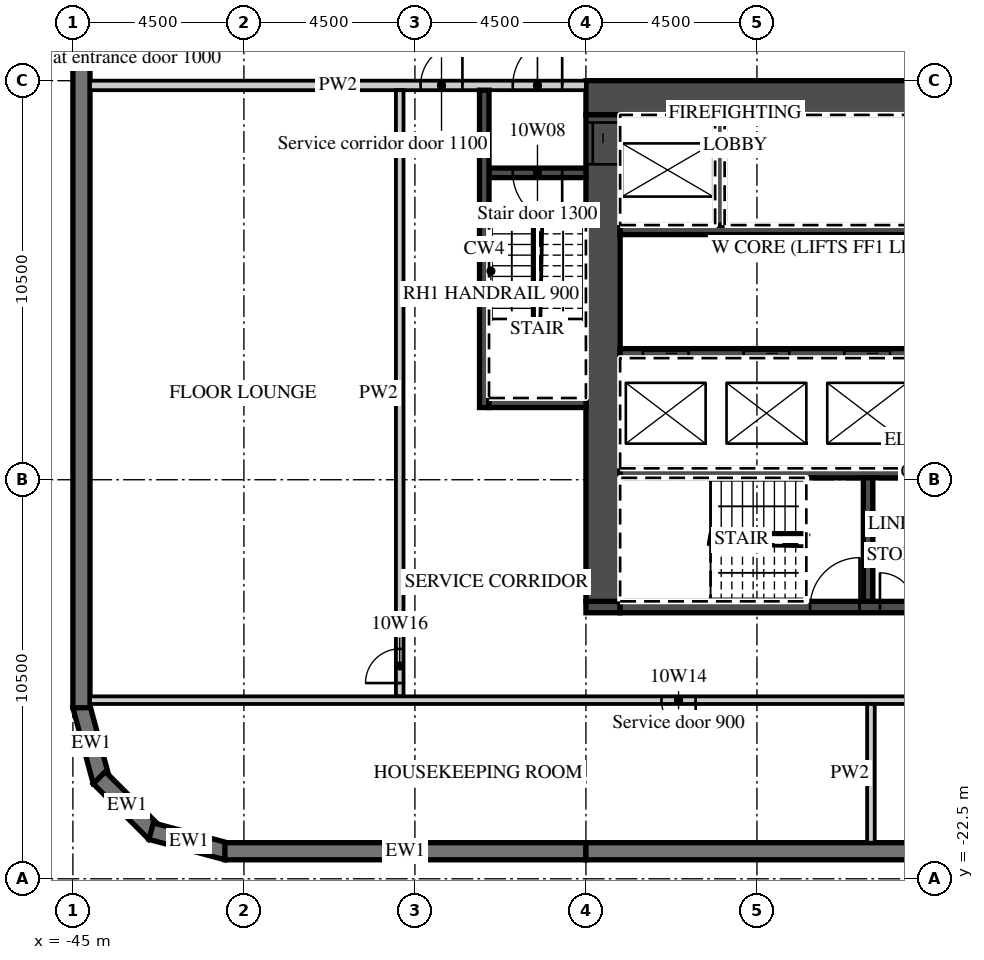
"""IFC4 building model, lengths in metres.
Left out: names, types, materials, properties, quantities, classifications, styles, units other than length and angle.
Written with IfcOpenShell. Run it as: python <this file> out.ifc"""

import sys

from ifc_helpers import new_model, si_unit, direction, frame, frame_2d, origin, place, context, subcontext, project, spatial, polyline, rectangle, outline, extrude, element, fill, save


model = new_model("IFC4")
c1 = context("Model", 3, precision=1e-05, world=origin(), true_north=direction((0.0, 1.0)))
c2 = subcontext(c1, "Body", "Model", "MODEL_VIEW")
j1 = project(units=[si_unit("LENGTHUNIT", "METRE"), si_unit("PLANEANGLEUNIT", "RADIAN")], contexts=[c1])
p1 = place(None, origin())
s1 = spatial("IfcSite", under=j1, at=p1, CompositionType="ELEMENT")
p2 = place(p1, origin())
s2 = spatial("IfcBuilding", under=s1, at=p2, CompositionType="ELEMENT")
p3 = place(p2, frame((0.0, 0.0, 63.3)))
s3 = spatial("IfcBuildingStorey", under=s2, at=p3, CompositionType="ELEMENT", Elevation=63.3)
p4 = place(p3, frame((-44.783, -17.942, 0.0), z_axis=(0.0, 0.0, 1.0), x_axis=(0.25881466832, -0.965926999034, 0.0)))
e1 = element("IfcWall", 1, at=p4, inside=s3, PredefinedType="SOLIDWALL", context=c2, shape_type="SweptSolid", body=[
    extrude(outline(polyline([(0.0, -0.225), (2.071, -0.225), (1.95, 0.225), (0.121, 0.225), (0.0, -0.225)])), origin(), (0.0, 0.0, 1.0), 3.02),
])
p5 = place(p3, frame((-44.305, -19.841, 0.0), z_axis=(0.0, 0.0, 1.0), x_axis=(0.707106781187, -0.707106781187, 0.0)))
e2 = element("IfcWall", 2, at=p5, inside=s3, PredefinedType="SOLIDWALL", context=c2, shape_type="SweptSolid", body=[
    extrude(outline(polyline([(0.0, -0.225), (2.071, -0.225), (1.95, 0.225), (0.121, 0.225), (0.0, -0.225)])), origin(), (0.0, 0.0, 1.0), 3.02),
])
p6 = place(p3, frame((-42.942, -21.247, 0.0), z_axis=(0.0, 0.0, 1.0), x_axis=(0.965926999034, -0.25881466832, 0.0)))
e3 = element("IfcWall", 3, at=p6, inside=s3, PredefinedType="SOLIDWALL", context=c2, shape_type="SweptSolid", body=[
    extrude(outline(polyline([(-0.0, -0.225), (2.07, -0.225), (1.95, 0.225), (0.12, 0.225), (-0.0, -0.225)])), origin(), (0.0, 0.0, 1.0), 3.02),
])
p7 = place(p3, frame((-41.0, -21.775, 0.0), z_axis=(0.0, 0.0, 1.0), x_axis=(1.0, 0.0, 0.0)))
e4 = element("IfcWall", 4, at=p7, inside=s3, PredefinedType="SOLIDWALL", context=c2, shape_type="SweptSolid", body=[
    extrude(rectangle(XDim=9.5, YDim=0.45, at=frame_2d((4.75, 0.0))), origin(), (0.0, 0.0, 1.0), 3.02),
])
p8 = place(p3, frame((-31.5, -21.775, 0.0), z_axis=(0.0, 0.0, 1.0), x_axis=(1.0, 0.0, 0.0)))
e5 = element("IfcWall", 5, at=p8, inside=s3, PredefinedType="SOLIDWALL", context=c2, shape_type="SweptSolid", body=[
    extrude(rectangle(XDim=18.0, YDim=0.45, at=frame_2d((9.0, 0.0))), origin(), (0.0, 0.0, 1.0), 3.02),
])
p9 = place(p3, frame((-44.775, 18.0, 0.0), z_axis=(0.0, 0.0, 1.0), x_axis=(0.0, -1.0, 0.0)))
e6 = element("IfcWall", 6, at=p9, inside=s3, PredefinedType="SOLIDWALL", context=c2, shape_type="SweptSolid", body=[
    extrude(rectangle(XDim=36.0, YDim=0.45, at=frame_2d((18.0, 0.0))), origin(), (0.0, 0.0, 1.0), 3.02),
])
p10 = place(p9, frame((3.9, 0.0, 0.45)))
e7 = element("IfcOpeningElement", 7, at=p10, cuts=e6, PredefinedType="OPENING", context=c2, shape_type="SweptSolid", body=[
    extrude(rectangle(XDim=3.3, YDim=2.25, at=frame_2d((1.65, 1.125))), frame((0.0, 0.235, 0.0), z_axis=(0.0, -1.0, 0.0), x_axis=(1.0, 0.0, 0.0)), (0.0, 0.0, 1.0), 0.47),
])
p11 = place(p9, frame((8.4, 0.0, 0.45)))
e8 = element("IfcOpeningElement", 8, at=p11, cuts=e6, PredefinedType="OPENING", context=c2, shape_type="SweptSolid", body=[
    extrude(rectangle(XDim=3.3, YDim=2.25, at=frame_2d((1.65, 1.125))), frame((0.0, 0.235, 0.0), z_axis=(0.0, -1.0, 0.0), x_axis=(1.0, 0.0, 0.0)), (0.0, 0.0, 1.0), 0.47),
])
p12 = place(p9, frame((12.9, 0.0, 0.45)))
e9 = element("IfcOpeningElement", 9, at=p12, cuts=e6, PredefinedType="OPENING", context=c2, shape_type="SweptSolid", body=[
    extrude(rectangle(XDim=3.3, YDim=2.25, at=frame_2d((1.65, 1.125))), frame((0.0, 0.235, 0.0), z_axis=(0.0, -1.0, 0.0), x_axis=(1.0, 0.0, 0.0)), (0.0, 0.0, 1.0), 0.47),
])
p13 = place(p3, frame((-31.5, -1.95, 0.0), z_axis=(0.0, 0.0, 1.0), x_axis=(1.0, 0.0, 0.0)))
e10 = element("IfcWall", 10, at=p13, inside=s3, PredefinedType="SHEAR", context=c2, shape_type="SweptSolid", body=[
    extrude(rectangle(XDim=18.0, YDim=0.9, at=frame_2d((9.0, 0.0))), origin(), (0.0, 0.0, 1.0), 3.02),
])
p14 = place(p13, frame((14.725, 0.0, 0.0)))
e11 = element("IfcOpeningElement", 11, at=p14, cuts=e10, PredefinedType="OPENING", context=c2, shape_type="SweptSolid", body=[
    extrude(rectangle(XDim=1.8, YDim=2.1, at=frame_2d((0.9, 1.05))), frame((0.0, 0.46, 0.0), z_axis=(0.0, -1.0, 0.0), x_axis=(1.0, 0.0, 0.0)), (0.0, 0.0, 1.0), 0.92),
])
p15 = place(p3, frame((-31.5, -15.35, 0.0), z_axis=(0.0, 0.0, 1.0), x_axis=(1.0, 0.0, 0.0)))
e12 = element("IfcWall", 12, at=p15, inside=s3, PredefinedType="SHEAR", context=c2, shape_type="SweptSolid", body=[
    extrude(rectangle(XDim=0.9, YDim=0.3, at=frame_2d((0.45, 0.0))), origin(), (0.0, 0.0, 1.0), 3.02),
])
p16 = place(p3, frame((-30.6, -15.35, 0.0), z_axis=(0.0, 0.0, 1.0), x_axis=(1.0, 0.0, 0.0)))
e13 = element("IfcWall", 13, at=p16, inside=s3, PredefinedType="SHEAR", context=c2, shape_type="SweptSolid", body=[
    extrude(rectangle(XDim=10.3, YDim=0.3, at=frame_2d((5.15, 0.0))), origin(), (0.0, 0.0, 1.0), 3.02),
])
p17 = place(p16, frame((5.0, 0.0, 0.0)))
e14 = element("IfcOpeningElement", 14, at=p17, cuts=e13, PredefinedType="OPENING", context=c2, shape_type="SweptSolid", body=[
    extrude(rectangle(XDim=1.3, YDim=2.1, at=frame_2d((0.65, 1.05))), frame((0.0, 0.16, 0.0), z_axis=(0.0, -1.0, 0.0), x_axis=(1.0, 0.0, 0.0)), (0.0, 0.0, 1.0), 0.32),
])
p18 = place(p16, frame((6.837, 0.0, 0.0)))
e15 = element("IfcOpeningElement", 15, at=p18, cuts=e13, PredefinedType="OPENING", context=c2, shape_type="SweptSolid", body=[
    extrude(rectangle(XDim=0.9, YDim=2.1, at=frame_2d((0.45, 1.05))), frame((0.0, 0.16, 0.0), z_axis=(0.0, -1.0, 0.0), x_axis=(1.0, 0.0, 0.0)), (0.0, 0.0, 1.0), 0.32),
])
p19 = place(p16, frame((8.663, 0.0, 0.0)))
e16 = element("IfcOpeningElement", 16, at=p19, cuts=e13, PredefinedType="OPENING", context=c2, shape_type="SweptSolid", body=[
    extrude(rectangle(XDim=0.9, YDim=2.1, at=frame_2d((0.45, 1.05))), frame((0.0, 0.16, 0.0), z_axis=(0.0, -1.0, 0.0), x_axis=(1.0, 0.0, 0.0)), (0.0, 0.0, 1.0), 0.32),
])
p20 = place(p3, frame((-31.05, -15.2, 0.0), z_axis=(0.0, 0.0, 1.0), x_axis=(0.0, 1.0, 0.0)))
e17 = element("IfcWall", 17, at=p20, inside=s3, PredefinedType="SHEAR", context=c2, shape_type="SweptSolid", body=[
    extrude(rectangle(XDim=12.8, YDim=0.9, at=frame_2d((6.4, 0.0))), origin(), (0.0, 0.0, 1.0), 3.02),
])
p21 = place(p20, frame((11.5, 0.0, 0.0)))
e18 = element("IfcOpeningElement", 18, at=p21, cuts=e17, PredefinedType="OPENING", context=c2, shape_type="SweptSolid", body=[
    extrude(rectangle(XDim=1.1, YDim=2.1, at=frame_2d((0.55, 1.05))), frame((0.0, 0.46, 0.0), z_axis=(0.0, -1.0, 0.0), x_axis=(1.0, 0.0, 0.0)), (0.0, 0.0, 1.0), 0.92),
])
p22 = place(p3, frame((-30.6, -5.425, 0.0), z_axis=(0.0, 0.0, 1.0), x_axis=(1.0, 0.0, 0.0)))
e19 = element("IfcWall", 19, at=p22, inside=s3, PredefinedType="SHEAR", context=c2, shape_type="SweptSolid", body=[
    extrude(rectangle(XDim=13.0, YDim=0.25, at=frame_2d((6.5, 0.0))), origin(), (0.0, 0.0, 1.0), 3.02),
])
p23 = place(p3, frame((-27.975, -5.3, 0.0), z_axis=(0.0, 0.0, 1.0), x_axis=(0.0, 1.0, 0.0)))
e20 = element("IfcWall", 20, at=p23, inside=s3, PredefinedType="SHEAR", context=c2, shape_type="SweptSolid", body=[
    extrude(rectangle(XDim=2.9, YDim=0.25, at=frame_2d((1.45, 0.0))), origin(), (0.0, 0.0, 1.0), 3.02),
])
p24 = place(p3, frame((-30.6, -8.675, 0.0), z_axis=(0.0, 0.0, 1.0), x_axis=(1.0, 0.0, 0.0)))
e21 = element("IfcWall", 21, at=p24, inside=s3, PredefinedType="SHEAR", context=c2, shape_type="SweptSolid", body=[
    extrude(rectangle(XDim=16.2, YDim=0.25, at=frame_2d((8.1, 0.0))), origin(), (0.0, 0.0, 1.0), 3.02),
])
p25 = place(p24, frame((0.6, 0.0, 0.0)))
e22 = element("IfcOpeningElement", 22, at=p25, cuts=e21, PredefinedType="OPENING", context=c2, shape_type="SweptSolid", body=[
    extrude(rectangle(XDim=1.2, YDim=2.1, at=frame_2d((0.6, 1.05))), frame((0.0, 0.135, 0.0), z_axis=(0.0, -1.0, 0.0), x_axis=(1.0, 0.0, 0.0)), (0.0, 0.0, 1.0), 0.27),
])
p26 = place(p24, frame((3.25, 0.0, 0.0)))
e23 = element("IfcOpeningElement", 23, at=p26, cuts=e21, PredefinedType="OPENING", context=c2, shape_type="SweptSolid", body=[
    extrude(rectangle(XDim=1.2, YDim=2.1, at=frame_2d((0.6, 1.05))), frame((0.0, 0.135, 0.0), z_axis=(0.0, -1.0, 0.0), x_axis=(1.0, 0.0, 0.0)), (0.0, 0.0, 1.0), 0.27),
])
p27 = place(p24, frame((5.9, 0.0, 0.0)))
e24 = element("IfcOpeningElement", 24, at=p27, cuts=e21, PredefinedType="OPENING", context=c2, shape_type="SweptSolid", body=[
    extrude(rectangle(XDim=1.2, YDim=2.1, at=frame_2d((0.6, 1.05))), frame((0.0, 0.135, 0.0), z_axis=(0.0, -1.0, 0.0), x_axis=(1.0, 0.0, 0.0)), (0.0, 0.0, 1.0), 0.27),
])
p28 = place(p24, frame((14.25, 0.0, 0.0)))
e25 = element("IfcOpeningElement", 25, at=p28, cuts=e21, PredefinedType="OPENING", context=c2, shape_type="SweptSolid", body=[
    extrude(rectangle(XDim=1.3, YDim=2.1, at=frame_2d((0.65, 1.05))), frame((0.0, 0.135, 0.0), z_axis=(0.0, -1.0, 0.0), x_axis=(1.0, 0.0, 0.0)), (0.0, 0.0, 1.0), 0.27),
])
p29 = place(p3, frame((-30.6, -11.825, 0.0), z_axis=(0.0, 0.0, 1.0), x_axis=(1.0, 0.0, 0.0)))
e26 = element("IfcWall", 26, at=p29, inside=s3, PredefinedType="SHEAR", context=c2, shape_type="SweptSolid", body=[
    extrude(rectangle(XDim=13.25, YDim=0.25, at=frame_2d((6.625, 0.0))), origin(), (0.0, 0.0, 1.0), 3.02),
])
p30 = place(p3, frame((-24.075, -15.2, 0.0), z_axis=(0.0, 0.0, 1.0), x_axis=(0.0, 1.0, 0.0)))
e27 = element("IfcWall", 27, at=p30, inside=s3, PredefinedType="SHEAR", context=c2, shape_type="SweptSolid", body=[
    extrude(rectangle(XDim=3.25, YDim=0.25, at=frame_2d((1.625, 0.0))), origin(), (0.0, 0.0, 1.0), 3.02),
])
p31 = place(p3, frame((-44.55, -1.625, 0.0), z_axis=(0.0, 0.0, 1.0), x_axis=(1.0, 0.0, 0.0)))
e28 = element("IfcWall", 28, at=p31, inside=s3, PredefinedType="PARTITIONING", context=c2, shape_type="SweptSolid", body=[
    extrude(rectangle(XDim=13.05, YDim=0.25, at=frame_2d((6.525, 0.0))), origin(), (0.0, 0.0, 1.0), 3.02),
])
p32 = place(p31, frame((11.125, 0.0, 0.0)))
e29 = element("IfcOpeningElement", 29, at=p32, cuts=e28, PredefinedType="OPENING", context=c2, shape_type="SweptSolid", body=[
    extrude(rectangle(XDim=1.3, YDim=2.1, at=frame_2d((0.65, 1.05))), frame((0.0, 0.135, 0.0), z_axis=(0.0, -1.0, 0.0), x_axis=(1.0, 0.0, 0.0)), (0.0, 0.0, 1.0), 0.27),
])
p33 = place(p31, frame((8.7, 0.0, 0.0)))
e30 = element("IfcOpeningElement", 30, at=p33, cuts=e28, PredefinedType="OPENING", context=c2, shape_type="SweptSolid", body=[
    extrude(rectangle(XDim=1.1, YDim=2.1, at=frame_2d((0.55, 1.05))), frame((0.0, 0.135, 0.0), z_axis=(0.0, -1.0, 0.0), x_axis=(1.0, 0.0, 0.0)), (0.0, 0.0, 1.0), 0.27),
])
p34 = place(p3, frame((-34.05, -3.925, 0.0), z_axis=(0.0, 0.0, 1.0), x_axis=(1.0, 0.0, 0.0)))
e31 = element("IfcWall", 31, at=p34, inside=s3, PredefinedType="SHEAR", context=c2, shape_type="SweptSolid", body=[
    extrude(rectangle(XDim=2.55, YDim=0.25, at=frame_2d((1.275, 0.0))), origin(), (0.0, 0.0, 1.0), 3.02),
])
p35 = place(p34, frame((0.625, 0.0, 0.0)))
e32 = element("IfcOpeningElement", 32, at=p35, cuts=e31, PredefinedType="OPENING", context=c2, shape_type="SweptSolid", body=[
    extrude(rectangle(XDim=1.3, YDim=2.1, at=frame_2d((0.65, 1.05))), frame((0.0, 0.135, 0.0), z_axis=(0.0, -1.0, 0.0), x_axis=(1.0, 0.0, 0.0)), (0.0, 0.0, 1.0), 0.27),
])
p36 = place(p3, frame((-34.175, -10.1, 0.0), z_axis=(0.0, 0.0, 1.0), x_axis=(0.0, 1.0, 0.0)))
e33 = element("IfcWall", 33, at=p36, inside=s3, PredefinedType="SHEAR", context=c2, shape_type="SweptSolid", body=[
    extrude(rectangle(XDim=8.35, YDim=0.25, at=frame_2d((4.175, 0.0))), origin(), (0.0, 0.0, 1.0), 3.02),
])
p37 = place(p3, frame((-34.05, -9.975, 0.0), z_axis=(0.0, 0.0, 1.0), x_axis=(1.0, 0.0, 0.0)))
e34 = element("IfcWall", 34, at=p37, inside=s3, PredefinedType="SHEAR", context=c2, shape_type="SweptSolid", body=[
    extrude(rectangle(XDim=2.55, YDim=0.25, at=frame_2d((1.275, 0.0))), origin(), (0.0, 0.0, 1.0), 3.02),
])
p38 = place(p3, frame((-36.4, -17.7, 0.0), z_axis=(0.0, 0.0, 1.0), x_axis=(0.0, 1.0, 0.0)))
e35 = element("IfcWall", 35, at=p38, inside=s3, PredefinedType="PARTITIONING", context=c2, shape_type="SweptSolid", body=[
    extrude(rectangle(XDim=15.95, YDim=0.2, at=frame_2d((7.975, 0.0))), origin(), (0.0, 0.0, 1.0), 3.02),
])
p39 = place(p38, frame((0.35, 0.0, 0.0)))
e36 = element("IfcOpeningElement", 36, at=p39, cuts=e35, PredefinedType="OPENING", context=c2, shape_type="SweptSolid", body=[
    extrude(rectangle(XDim=0.9, YDim=2.1, at=frame_2d((0.45, 1.05))), frame((0.0, 0.11, 0.0), z_axis=(0.0, -1.0, 0.0), x_axis=(1.0, 0.0, 0.0)), (0.0, 0.0, 1.0), 0.22),
])
p40 = place(p3, frame((-44.55, -17.8, 0.0), z_axis=(0.0, 0.0, 1.0), x_axis=(1.0, 0.0, 0.0)))
e37 = element("IfcWall", 37, at=p40, inside=s3, PredefinedType="PARTITIONING", context=c2, shape_type="SweptSolid", body=[
    extrude(rectangle(XDim=30.95, YDim=0.2, at=frame_2d((15.475, 0.0))), origin(), (0.0, 0.0, 1.0), 3.02),
])
p41 = place(p40, frame((15.038, 0.0, 0.0)))
e38 = element("IfcOpeningElement", 38, at=p41, cuts=e37, PredefinedType="OPENING", context=c2, shape_type="SweptSolid", body=[
    extrude(rectangle(XDim=0.9, YDim=2.1, at=frame_2d((0.45, 1.05))), frame((0.0, 0.11, 0.0), z_axis=(0.0, -1.0, 0.0), x_axis=(1.0, 0.0, 0.0)), (0.0, 0.0, 1.0), 0.22),
])
p42 = place(p40, frame((23.337, 0.0, 0.0)))
e39 = element("IfcOpeningElement", 39, at=p42, cuts=e37, PredefinedType="OPENING", context=c2, shape_type="SweptSolid", body=[
    extrude(rectangle(XDim=0.9, YDim=2.1, at=frame_2d((0.45, 1.05))), frame((0.0, 0.11, 0.0), z_axis=(0.0, -1.0, 0.0), x_axis=(1.0, 0.0, 0.0)), (0.0, 0.0, 1.0), 0.22),
])
p43 = place(p3, frame((-24.0, -21.55, 0.0), z_axis=(0.0, 0.0, 1.0), x_axis=(0.0, 1.0, 0.0)))
e40 = element("IfcWall", 40, at=p43, inside=s3, PredefinedType="PARTITIONING", context=c2, shape_type="SweptSolid", body=[
    extrude(rectangle(XDim=3.65, YDim=0.2, at=frame_2d((1.825, 0.0))), origin(), (0.0, 0.0, 1.0), 3.02),
])
p44 = place(p25, origin())
e41 = element("IfcDoor", 41, at=p44, inside=s3, OperationType="SLIDING_TO_LEFT", PredefinedType="DOOR", context=c2, shape_type="SweptSolid", body=[
    extrude(rectangle(XDim=1.2, YDim=2.1, at=frame_2d((0.6, 1.05))), frame((0.0, 0.025, 0.0), z_axis=(0.0, -1.0, 0.0), x_axis=(1.0, 0.0, 0.0)), (0.0, 0.0, 1.0), 0.05),
])
fill(e22, e41)
p45 = place(p26, origin())
e42 = element("IfcDoor", 42, at=p45, inside=s3, OperationType="SLIDING_TO_RIGHT", PredefinedType="DOOR", context=c2, shape_type="SweptSolid", body=[
    extrude(rectangle(XDim=1.2, YDim=2.1, at=frame_2d((0.6, 1.05))), frame((0.0, 0.025, 0.0), z_axis=(0.0, -1.0, 0.0), x_axis=(1.0, 0.0, 0.0)), (0.0, 0.0, 1.0), 0.05),
])
fill(e23, e42)
p46 = place(p27, origin())
e43 = element("IfcDoor", 43, at=p46, inside=s3, OperationType="SLIDING_TO_RIGHT", PredefinedType="DOOR", context=c2, shape_type="SweptSolid", body=[
    extrude(rectangle(XDim=1.2, YDim=2.1, at=frame_2d((0.6, 1.05))), frame((0.0, 0.025, 0.0), z_axis=(0.0, -1.0, 0.0), x_axis=(1.0, 0.0, 0.0)), (0.0, 0.0, 1.0), 0.05),
])
fill(e24, e43)
p47 = place(p21, origin())
e44 = element("IfcDoor", 44, at=p47, inside=s3, OperationType="SLIDING_TO_RIGHT", PredefinedType="DOOR", context=c2, shape_type="SweptSolid", body=[
    extrude(rectangle(XDim=1.1, YDim=2.1, at=frame_2d((0.55, 1.05))), frame((0.0, 0.025, 0.0), z_axis=(0.0, -1.0, 0.0), x_axis=(1.0, 0.0, 0.0)), (0.0, 0.0, 1.0), 0.05),
])
fill(e18, e44)
p48 = place(p32, origin())
e45 = element("IfcDoor", 45, at=p48, inside=s3, OperationType="SINGLE_SWING_RIGHT", PredefinedType="DOOR", context=c2, shape_type="SweptSolid", body=[
    extrude(rectangle(XDim=1.3, YDim=2.1, at=frame_2d((0.65, 1.05))), frame((0.0, 0.025, 0.0), z_axis=(0.0, -1.0, 0.0), x_axis=(1.0, 0.0, 0.0)), (0.0, 0.0, 1.0), 0.05),
])
fill(e29, e45)
p49 = place(p35, origin())
e46 = element("IfcDoor", 46, at=p49, inside=s3, OperationType="SINGLE_SWING_RIGHT", PredefinedType="DOOR", context=c2, shape_type="SweptSolid", body=[
    extrude(rectangle(XDim=1.3, YDim=2.1, at=frame_2d((0.65, 1.05))), frame((0.0, 0.025, 0.0), z_axis=(0.0, -1.0, 0.0), x_axis=(1.0, 0.0, 0.0)), (0.0, 0.0, 1.0), 0.05),
])
fill(e32, e46)
p50 = place(p33, origin())
e47 = element("IfcDoor", 47, at=p50, inside=s3, OperationType="SINGLE_SWING_RIGHT", PredefinedType="DOOR", context=c2, shape_type="SweptSolid", body=[
    extrude(rectangle(XDim=1.1, YDim=2.1, at=frame_2d((0.55, 1.05))), frame((0.0, 0.025, 0.0), z_axis=(0.0, -1.0, 0.0), x_axis=(1.0, 0.0, 0.0)), (0.0, 0.0, 1.0), 0.05),
])
fill(e30, e47)
p51 = place(p17, origin())
e48 = element("IfcDoor", 48, at=p51, inside=s3, OperationType="SINGLE_SWING_RIGHT", PredefinedType="DOOR", context=c2, shape_type="SweptSolid", body=[
    extrude(rectangle(XDim=1.3, YDim=2.1, at=frame_2d((0.65, 1.05))), frame((0.0, 0.025, 0.0), z_axis=(0.0, -1.0, 0.0), x_axis=(1.0, 0.0, 0.0)), (0.0, 0.0, 1.0), 0.05),
])
fill(e14, e48)
p52 = place(p18, origin())
e49 = element("IfcDoor", 49, at=p52, inside=s3, OperationType="SINGLE_SWING_LEFT", PredefinedType="DOOR", context=c2, shape_type="SweptSolid", body=[
    extrude(rectangle(XDim=0.9, YDim=2.1, at=frame_2d((0.45, 1.05))), frame((0.0, 0.025, 0.0), z_axis=(0.0, -1.0, 0.0), x_axis=(1.0, 0.0, 0.0)), (0.0, 0.0, 1.0), 0.05),
])
fill(e15, e49)
p53 = place(p41, origin())
e50 = element("IfcDoor", 50, at=p53, inside=s3, OperationType="SINGLE_SWING_RIGHT", PredefinedType="DOOR", context=c2, shape_type="SweptSolid", body=[
    extrude(rectangle(XDim=0.9, YDim=2.1, at=frame_2d((0.45, 1.05))), frame((0.0, 0.025, 0.0), z_axis=(0.0, -1.0, 0.0), x_axis=(1.0, 0.0, 0.0)), (0.0, 0.0, 1.0), 0.05),
])
fill(e38, e50)
p54 = place(p39, origin())
e51 = element("IfcDoor", 51, at=p54, inside=s3, OperationType="SINGLE_SWING_LEFT", PredefinedType="DOOR", context=c2, shape_type="SweptSolid", body=[
    extrude(rectangle(XDim=0.9, YDim=2.1, at=frame_2d((0.45, 1.05))), frame((0.0, 0.025, 0.0), z_axis=(0.0, -1.0, 0.0), x_axis=(1.0, 0.0, 0.0)), (0.0, 0.0, 1.0), 0.05),
])
fill(e36, e51)
save(model, sys.argv[1])
